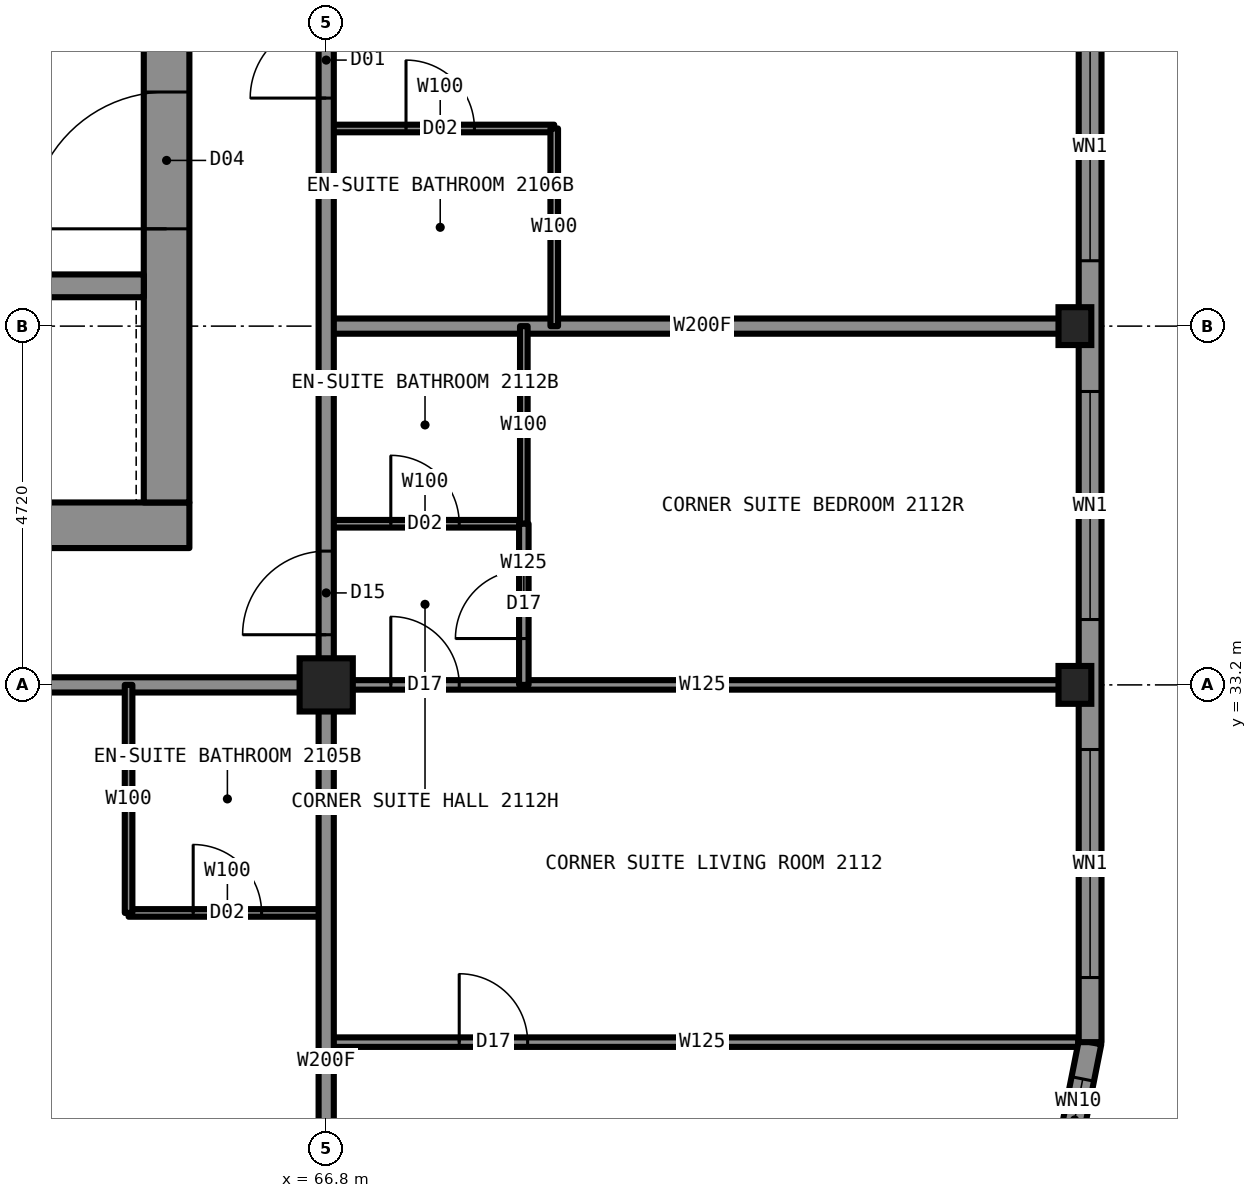
"""IFC4 building model, lengths in metres.
Left out: names, types, materials, properties, quantities, classifications, styles, units other than length and angle.
Written with IfcOpenShell. Run it as: python <this file> out.ifc"""

import sys

from ifc_helpers import new_model, si_unit, direction, frame, frame_2d, origin, origin_2d, place, context, subcontext, project, spatial, rectangle, hollow_rectangle, i_section, extrude, element, fill, save


model = new_model("IFC4")
c1 = context("Model", 3, precision=1e-05, world=origin(), true_north=direction((0.0, 1.0)))
c2 = subcontext(c1, "Body", "Model", "MODEL_VIEW")
j1 = project(units=[si_unit("LENGTHUNIT", "METRE"), si_unit("PLANEANGLEUNIT", "RADIAN")], contexts=[c1])
p1 = place(None, origin())
s1 = spatial("IfcSite", under=j1, at=p1, CompositionType="ELEMENT")
p2 = place(p1, origin())
s2 = spatial("IfcBuilding", under=s1, at=p2, CompositionType="ELEMENT")
p3 = place(p2, frame((0.0, 0.0, 81.0)))
s3 = spatial("IfcBuildingStorey", under=s2, at=p3, CompositionType="ELEMENT", Elevation=81.0)
for number, where, z_axis, x_axis in (
    (1, (76.65, 33.2, 0.0), (0.0, 0.0, 1.0), (1.0, 0.0, 0.0)),
    (2, (76.65, 37.92, 0.0), (0.0, 0.0, 1.0), (1.0, 0.0, 0.0)),
):
    element("IfcColumn", number, at=place(p3, frame(where, z_axis=z_axis, x_axis=x_axis)), inside=s3, PredefinedType="COLUMN", context=c2, shape_type="SweptSolid", body=[
        extrude(i_section(OverallWidth=0.432, OverallDepth=0.498, WebThickness=0.056, FlangeThickness=0.089, at=origin_2d()), origin(), (0.0, 0.0, 1.0), 3.5),
    ])
p4 = place(p3, frame((66.8, 33.2, 0.0), z_axis=(0.0, 0.0, 1.0), x_axis=(1.0, 0.0, 0.0)))
e3 = element("IfcColumn", 3, at=p4, inside=s3, PredefinedType="COLUMN", context=c2, shape_type="SweptSolid", body=[
    extrude(hollow_rectangle(XDim=0.7, YDim=0.7, WallThickness=0.06, at=origin_2d()), origin(), (0.0, 0.0, 1.0), 3.5),
])
p5 = place(p3, frame((45.0, 35.3, 0.0), z_axis=(0.0, 0.0, 1.0), x_axis=(1.0, 0.0, 0.0)))
e4 = element("IfcWall", 4, at=p5, inside=s3, PredefinedType="SHEAR", context=c2, shape_type="SweptSolid", body=[
    extrude(rectangle(XDim=20.0, YDim=0.6, at=frame_2d((10.0, 0.0))), origin(), (0.0, 0.0, 1.0), 3.5),
])
p6 = place(p3, frame((64.7, 35.6, 0.0), z_axis=(0.0, 0.0, 1.0), x_axis=(0.0, 1.0, 0.0)))
e5 = element("IfcWall", 5, at=p6, inside=s3, PredefinedType="SHEAR", context=c2, shape_type="SweptSolid", body=[
    extrude(rectangle(XDim=18.8, YDim=0.6, at=frame_2d((9.4, 0.0))), origin(), (0.0, 0.0, 1.0), 3.5),
])
p7 = place(p6, frame((13.4, 0.0, 0.0)))
e6 = element("IfcOpeningElement", 6, at=p7, cuts=e5, PredefinedType="OPENING", context=c2, shape_type="SweptSolid", body=[
    extrude(rectangle(XDim=1.8, YDim=2.2, at=frame_2d((0.9, 1.1))), frame((0.0, 0.31, 0.0), z_axis=(0.0, -1.0, 0.0), x_axis=(1.0, 0.0, 0.0)), (0.0, 0.0, 1.0), 0.62),
])
p8 = place(p6, frame((3.6, 0.0, 0.0)))
e7 = element("IfcOpeningElement", 7, at=p8, cuts=e5, PredefinedType="OPENING", context=c2, shape_type="SweptSolid", body=[
    extrude(rectangle(XDim=1.8, YDim=2.2, at=frame_2d((0.9, 1.1))), frame((0.0, 0.31, 0.0), z_axis=(0.0, -1.0, 0.0), x_axis=(1.0, 0.0, 0.0)), (0.0, 0.0, 1.0), 0.62),
])
p9 = place(p3, frame((45.6, 38.45, 0.0), z_axis=(0.0, 0.0, 1.0), x_axis=(1.0, 0.0, 0.0)))
e8 = element("IfcWall", 8, at=p9, inside=s3, PredefinedType="SHEAR", context=c2, shape_type="SweptSolid", body=[
    extrude(rectangle(XDim=18.8, YDim=0.3, at=frame_2d((9.4, 0.0))), origin(), (0.0, 0.0, 1.0), 3.5),
])
p10 = place(p3, frame((43.2, 33.2, 0.0), z_axis=(0.0, 0.0, 1.0), x_axis=(1.0, 0.0, 0.0)))
e9 = element("IfcWall", 9, at=p10, inside=s3, PredefinedType="PARTITIONING", context=c2, shape_type="SweptSolid", body=[
    extrude(rectangle(XDim=23.6, YDim=0.2, at=frame_2d((11.8, 0.0))), origin(), (0.0, 0.0, 1.0), 3.33),
])
p11 = place(p10, frame((3.0, 0.0, 0.0)))
e10 = element("IfcOpeningElement", 10, at=p11, cuts=e9, PredefinedType="OPENING", context=c2, shape_type="SweptSolid", body=[
    extrude(rectangle(XDim=1.0, YDim=2.2, at=frame_2d((0.5, 1.1))), frame((0.0, 0.11, 0.0), z_axis=(0.0, -1.0, 0.0), x_axis=(1.0, 0.0, 0.0)), (0.0, 0.0, 1.0), 0.22),
])
p12 = place(p10, frame((11.29, 0.0, 0.0)))
e11 = element("IfcOpeningElement", 11, at=p12, cuts=e9, PredefinedType="OPENING", context=c2, shape_type="SweptSolid", body=[
    extrude(rectangle(XDim=1.1, YDim=2.2, at=frame_2d((0.55, 1.1))), frame((0.0, 0.11, 0.0), z_axis=(0.0, -1.0, 0.0), x_axis=(1.0, 0.0, 0.0)), (0.0, 0.0, 1.0), 0.22),
])
p13 = place(p3, frame((66.8, 33.2, 0.0), z_axis=(0.0, 0.0, 1.0), x_axis=(1.0, 0.0, 0.0)))
e12 = element("IfcWall", 12, at=p13, inside=s3, PredefinedType="PARTITIONING", context=c2, shape_type="SweptSolid", body=[
    extrude(rectangle(XDim=9.9, YDim=0.125, at=frame_2d((4.95, 0.0))), origin(), (0.0, 0.0, 1.0), 2.573),
])
p14 = place(p13, frame((0.85, 0.0, 0.0)))
e13 = element("IfcOpeningElement", 13, at=p14, cuts=e12, PredefinedType="OPENING", context=c2, shape_type="SweptSolid", body=[
    extrude(rectangle(XDim=0.9, YDim=2.2, at=frame_2d((0.45, 1.1))), frame((0.0, 0.073, 0.0), z_axis=(0.0, -1.0, 0.0), x_axis=(1.0, 0.0, 0.0)), (0.0, 0.0, 1.0), 0.145),
])
p15 = place(p3, frame((64.2, 30.2, 0.0), z_axis=(0.0, 0.0, 1.0), x_axis=(1.0, 0.0, 0.0)))
e14 = element("IfcWall", 14, at=p15, inside=s3, PredefinedType="PARTITIONING", context=c2, shape_type="SweptSolid", body=[
    extrude(rectangle(XDim=2.6, YDim=0.1, at=frame_2d((1.3, 0.0))), origin(), (0.0, 0.0, 1.0), 3.33),
])
p16 = place(p15, frame((0.85, 0.0, 0.0)))
e15 = element("IfcOpeningElement", 15, at=p16, cuts=e14, PredefinedType="OPENING", context=c2, shape_type="SweptSolid", body=[
    extrude(rectangle(XDim=0.9, YDim=2.1, at=frame_2d((0.45, 1.05))), frame((0.0, 0.06, 0.0), z_axis=(0.0, -1.0, 0.0), x_axis=(1.0, 0.0, 0.0)), (0.0, 0.0, 1.0), 0.12),
])
p17 = place(p3, frame((66.8, 28.5, 0.0), z_axis=(0.0, 0.0, 1.0), x_axis=(1.0, 0.0, 0.0)))
e16 = element("IfcWall", 16, at=p17, inside=s3, PredefinedType="PARTITIONING", context=c2, shape_type="SweptSolid", body=[
    extrude(rectangle(XDim=9.894, YDim=0.125, at=frame_2d((4.947, 0.0))), origin(), (0.0, 0.0, 1.0), 3.33),
])
p18 = place(p17, frame((1.75, 0.0, 0.0)))
e17 = element("IfcOpeningElement", 17, at=p18, cuts=e16, PredefinedType="OPENING", context=c2, shape_type="SweptSolid", body=[
    extrude(rectangle(XDim=0.9, YDim=2.2, at=frame_2d((0.45, 1.1))), frame((0.0, 0.073, 0.0), z_axis=(0.0, -1.0, 0.0), x_axis=(1.0, 0.0, 0.0)), (0.0, 0.0, 1.0), 0.145),
])
p19 = place(p3, frame((66.8, 40.52, 0.0), z_axis=(0.0, 0.0, 1.0), x_axis=(1.0, 0.0, 0.0)))
e18 = element("IfcWall", 18, at=p19, inside=s3, PredefinedType="PARTITIONING", context=c2, shape_type="SweptSolid", body=[
    extrude(rectangle(XDim=3.0, YDim=0.1, at=frame_2d((1.5, 0.0))), origin(), (0.0, 0.0, 1.0), 3.33),
])
p20 = place(p19, frame((1.05, 0.0, 0.0)))
e19 = element("IfcOpeningElement", 19, at=p20, cuts=e18, PredefinedType="OPENING", context=c2, shape_type="SweptSolid", body=[
    extrude(rectangle(XDim=0.9, YDim=2.1, at=frame_2d((0.45, 1.05))), frame((0.0, 0.06, 0.0), z_axis=(0.0, -1.0, 0.0), x_axis=(1.0, 0.0, 0.0)), (0.0, 0.0, 1.0), 0.12),
])
p21 = place(p3, frame((66.8, 37.92, 0.0), z_axis=(0.0, 0.0, 1.0), x_axis=(1.0, 0.0, 0.0)))
e20 = element("IfcWall", 20, at=p21, inside=s3, PredefinedType="PARTITIONING", context=c2, shape_type="SweptSolid", body=[
    extrude(rectangle(XDim=9.9, YDim=0.2, at=frame_2d((4.95, 0.0))), origin(), (0.0, 0.0, 1.0), 2.573),
])
p22 = place(p3, frame((66.8, 35.32, 0.0), z_axis=(0.0, 0.0, 1.0), x_axis=(1.0, 0.0, 0.0)))
e21 = element("IfcWall", 21, at=p22, inside=s3, PredefinedType="PARTITIONING", context=c2, shape_type="SweptSolid", body=[
    extrude(rectangle(XDim=2.6, YDim=0.1, at=frame_2d((1.3, 0.0))), origin(), (0.0, 0.0, 1.0), 3.33),
])
p23 = place(p22, frame((0.85, 0.0, 0.0)))
e22 = element("IfcOpeningElement", 22, at=p23, cuts=e21, PredefinedType="OPENING", context=c2, shape_type="SweptSolid", body=[
    extrude(rectangle(XDim=0.9, YDim=2.1, at=frame_2d((0.45, 1.05))), frame((0.0, 0.06, 0.0), z_axis=(0.0, -1.0, 0.0), x_axis=(1.0, 0.0, 0.0)), (0.0, 0.0, 1.0), 0.12),
])
p24 = place(p3, frame((66.8, 33.2, 0.0), z_axis=(0.0, 0.0, 1.0), x_axis=(0.0, 1.0, 0.0)))
e23 = element("IfcWall", 23, at=p24, inside=s3, PredefinedType="PARTITIONING", context=c2, shape_type="SweptSolid", body=[
    extrude(rectangle(XDim=23.6, YDim=0.2, at=frame_2d((11.8, 0.0))), origin(), (0.0, 0.0, 1.0), 3.33),
])
p25 = place(p24, frame((7.72, 0.0, 0.0)))
e24 = element("IfcOpeningElement", 24, at=p25, cuts=e23, PredefinedType="OPENING", context=c2, shape_type="SweptSolid", body=[
    extrude(rectangle(XDim=1.0, YDim=2.2, at=frame_2d((0.5, 1.1))), frame((0.0, 0.11, 0.0), z_axis=(0.0, -1.0, 0.0), x_axis=(1.0, 0.0, 0.0)), (0.0, 0.0, 1.0), 0.22),
])
p26 = place(p24, frame((16.42, 0.0, 0.0)))
e25 = element("IfcOpeningElement", 25, at=p26, cuts=e23, PredefinedType="OPENING", context=c2, shape_type="SweptSolid", body=[
    extrude(rectangle(XDim=1.0, YDim=2.2, at=frame_2d((0.5, 1.1))), frame((0.0, 0.11, 0.0), z_axis=(0.0, -1.0, 0.0), x_axis=(1.0, 0.0, 0.0)), (0.0, 0.0, 1.0), 0.22),
])
p27 = place(p24, frame((21.85, 0.0, 0.0)))
e26 = element("IfcOpeningElement", 26, at=p27, cuts=e23, PredefinedType="OPENING", context=c2, shape_type="SweptSolid", body=[
    extrude(rectangle(XDim=1.1, YDim=2.2, at=frame_2d((0.55, 1.1))), frame((0.0, 0.11, 0.0), z_axis=(0.0, -1.0, 0.0), x_axis=(1.0, 0.0, 0.0)), (0.0, 0.0, 1.0), 0.22),
])
p28 = place(p24, frame((0.66, 0.0, 0.0)))
e27 = element("IfcOpeningElement", 27, at=p28, cuts=e23, PredefinedType="OPENING", context=c2, shape_type="SweptSolid", body=[
    extrude(rectangle(XDim=1.1, YDim=2.2, at=frame_2d((0.55, 1.1))), frame((0.0, 0.11, 0.0), z_axis=(0.0, -1.0, 0.0), x_axis=(1.0, 0.0, 0.0)), (0.0, 0.0, 1.0), 0.22),
])
p29 = place(p3, frame((66.8, 23.3, 0.0), z_axis=(0.0, 0.0, 1.0), x_axis=(0.0, 1.0, 0.0)))
e28 = element("IfcWall", 28, at=p29, inside=s3, PredefinedType="PARTITIONING", context=c2, shape_type="SweptSolid", body=[
    extrude(rectangle(XDim=9.9, YDim=0.2, at=frame_2d((4.95, 0.0))), origin(), (0.0, 0.0, 1.0), 2.573),
])
p30 = place(p3, frame((69.4, 35.32, 0.0), z_axis=(0.0, 0.0, 1.0), x_axis=(0.0, 1.0, 0.0)))
e29 = element("IfcWall", 29, at=p30, inside=s3, PredefinedType="PARTITIONING", context=c2, shape_type="SweptSolid", body=[
    extrude(rectangle(XDim=2.6, YDim=0.1, at=frame_2d((1.3, 0.0))), origin(), (0.0, 0.0, 1.0), 3.33),
])
p31 = place(p3, frame((69.4, 33.2, 0.0), z_axis=(0.0, 0.0, 1.0), x_axis=(0.0, 1.0, 0.0)))
e30 = element("IfcWall", 30, at=p31, inside=s3, PredefinedType="PARTITIONING", context=c2, shape_type="SweptSolid", body=[
    extrude(rectangle(XDim=2.12, YDim=0.125, at=frame_2d((1.06, 0.0))), origin(), (0.0, 0.0, 1.0), 3.33),
])
p32 = place(p31, frame((0.61, 0.0, 0.0)))
e31 = element("IfcOpeningElement", 31, at=p32, cuts=e30, PredefinedType="OPENING", context=c2, shape_type="SweptSolid", body=[
    extrude(rectangle(XDim=0.9, YDim=2.2, at=frame_2d((0.45, 1.1))), frame((0.0, 0.073, 0.0), z_axis=(0.0, -1.0, 0.0), x_axis=(1.0, 0.0, 0.0)), (0.0, 0.0, 1.0), 0.145),
])
p33 = place(p3, frame((69.8, 37.92, 0.0), z_axis=(0.0, 0.0, 1.0), x_axis=(0.0, 1.0, 0.0)))
e32 = element("IfcWall", 32, at=p33, inside=s3, PredefinedType="PARTITIONING", context=c2, shape_type="SweptSolid", body=[
    extrude(rectangle(XDim=2.6, YDim=0.1, at=frame_2d((1.3, 0.0))), origin(), (0.0, 0.0, 1.0), 3.33),
])
p34 = place(p3, frame((64.2, 30.2, 0.0), z_axis=(0.0, 0.0, 1.0), x_axis=(0.0, 1.0, 0.0)))
e33 = element("IfcWall", 33, at=p34, inside=s3, PredefinedType="PARTITIONING", context=c2, shape_type="SweptSolid", body=[
    extrude(rectangle(XDim=3.0, YDim=0.1, at=frame_2d((1.5, 0.0))), origin(), (0.0, 0.0, 1.0), 3.33),
])
p35 = place(p3, frame((76.443, 26.453, 0.0), z_axis=(0.0, 0.0, 1.0), x_axis=(0.195081421501, 0.980787050784, 0.0)))
e34 = element("IfcWall", 34, at=p35, inside=s3, PredefinedType="SOLIDWALL", context=c2, shape_type="SweptSolid", body=[
    extrude(rectangle(XDim=2.087, YDim=0.3, at=frame_2d((1.044, 0.0))), origin(), (0.0, 0.0, 1.0), 3.33),
])
p36 = place(p35, frame((0.994, 0.0, 1.65)))
e35 = element("IfcOpeningElement", 35, at=p36, cuts=e34, PredefinedType="OPENING", context=c2, shape_type="SweptSolid", body=[
    extrude(rectangle(XDim=0.6, YDim=0.8, at=frame_2d((0.3, 0.4))), frame((0.0, 0.16, 0.0), z_axis=(0.0, -1.0, 0.0), x_axis=(1.0, 0.0, 0.0)), (0.0, 0.0, 1.0), 0.32),
])
p37 = place(p3, frame((76.85, 28.5, 0.0), z_axis=(0.0, 0.0, 1.0), x_axis=(0.0, 1.0, 0.0)))
e36 = element("IfcWall", 36, at=p37, inside=s3, PredefinedType="SOLIDWALL", context=c2, shape_type="SweptSolid", body=[
    extrude(rectangle(XDim=33.0, YDim=0.3, at=frame_2d((16.5, 0.0))), origin(), (0.0, 0.0, 1.0), 2.63),
])
p38 = place(p37, frame((0.85, 0.0, 0.5)))
e37 = element("IfcOpeningElement", 37, at=p38, cuts=e36, PredefinedType="OPENING", context=c2, shape_type="SweptSolid", body=[
    extrude(rectangle(XDim=3.0, YDim=2.0, at=frame_2d((1.5, 1.0))), frame((0.0, 0.16, 0.0), z_axis=(0.0, -1.0, 0.0), x_axis=(1.0, 0.0, 0.0)), (0.0, 0.0, 1.0), 0.32),
])
p39 = place(p37, frame((5.56, 0.0, 0.5)))
e38 = element("IfcOpeningElement", 38, at=p39, cuts=e36, PredefinedType="OPENING", context=c2, shape_type="SweptSolid", body=[
    extrude(rectangle(XDim=3.0, YDim=2.0, at=frame_2d((1.5, 1.0))), frame((0.0, 0.16, 0.0), z_axis=(0.0, -1.0, 0.0), x_axis=(1.0, 0.0, 0.0)), (0.0, 0.0, 1.0), 0.32),
])
p40 = place(p37, frame((10.28, 0.0, 0.5)))
e39 = element("IfcOpeningElement", 39, at=p40, cuts=e36, PredefinedType="OPENING", context=c2, shape_type="SweptSolid", body=[
    extrude(rectangle(XDim=3.0, YDim=2.0, at=frame_2d((1.5, 1.0))), frame((0.0, 0.16, 0.0), z_axis=(0.0, -1.0, 0.0), x_axis=(1.0, 0.0, 0.0)), (0.0, 0.0, 1.0), 0.32),
])
p41 = place(p37, frame((15.0, 0.0, 0.5)))
e40 = element("IfcOpeningElement", 40, at=p41, cuts=e36, PredefinedType="OPENING", context=c2, shape_type="SweptSolid", body=[
    extrude(rectangle(XDim=3.0, YDim=2.0, at=frame_2d((1.5, 1.0))), frame((0.0, 0.16, 0.0), z_axis=(0.0, -1.0, 0.0), x_axis=(1.0, 0.0, 0.0)), (0.0, 0.0, 1.0), 0.32),
])
p42 = place(p37, frame((19.72, 0.0, 0.5)))
e41 = element("IfcOpeningElement", 41, at=p42, cuts=e36, PredefinedType="OPENING", context=c2, shape_type="SweptSolid", body=[
    extrude(rectangle(XDim=3.0, YDim=2.0, at=frame_2d((1.5, 1.0))), frame((0.0, 0.16, 0.0), z_axis=(0.0, -1.0, 0.0), x_axis=(1.0, 0.0, 0.0)), (0.0, 0.0, 1.0), 0.32),
])
p43 = place(p37, frame((24.44, 0.0, 0.5)))
e42 = element("IfcOpeningElement", 42, at=p43, cuts=e36, PredefinedType="OPENING", context=c2, shape_type="SweptSolid", body=[
    extrude(rectangle(XDim=3.0, YDim=2.0, at=frame_2d((1.5, 1.0))), frame((0.0, 0.16, 0.0), z_axis=(0.0, -1.0, 0.0), x_axis=(1.0, 0.0, 0.0)), (0.0, 0.0, 1.0), 0.32),
])
p44 = place(p37, frame((29.15, 0.0, 0.5)))
e43 = element("IfcOpeningElement", 43, at=p44, cuts=e36, PredefinedType="OPENING", context=c2, shape_type="SweptSolid", body=[
    extrude(rectangle(XDim=3.0, YDim=2.0, at=frame_2d((1.5, 1.0))), frame((0.0, 0.16, 0.0), z_axis=(0.0, -1.0, 0.0), x_axis=(1.0, 0.0, 0.0)), (0.0, 0.0, 1.0), 0.32),
])
p45 = place(p16, origin())
e44 = element("IfcDoor", 44, at=p45, inside=s3, OperationType="SINGLE_SWING_RIGHT", PredefinedType="DOOR", context=c2, shape_type="SweptSolid", body=[
    extrude(rectangle(XDim=0.9, YDim=2.1, at=frame_2d((0.45, 1.05))), frame((0.0, 0.025, 0.0), z_axis=(0.0, -1.0, 0.0), x_axis=(1.0, 0.0, 0.0)), (0.0, 0.0, 1.0), 0.05),
])
fill(e15, e44)
p46 = place(p25, origin())
e45 = element("IfcDoor", 45, at=p46, inside=s3, OperationType="SINGLE_SWING_LEFT", PredefinedType="DOOR", context=c2, shape_type="SweptSolid", body=[
    extrude(rectangle(XDim=1.0, YDim=2.2, at=frame_2d((0.5, 1.1))), frame((0.0, 0.025, 0.0), z_axis=(0.0, -1.0, 0.0), x_axis=(1.0, 0.0, 0.0)), (0.0, 0.0, 1.0), 0.05),
])
fill(e24, e45)
p47 = place(p20, origin())
e46 = element("IfcDoor", 46, at=p47, inside=s3, OperationType="SINGLE_SWING_RIGHT", PredefinedType="DOOR", context=c2, shape_type="SweptSolid", body=[
    extrude(rectangle(XDim=0.9, YDim=2.1, at=frame_2d((0.45, 1.05))), frame((0.0, 0.025, 0.0), z_axis=(0.0, -1.0, 0.0), x_axis=(1.0, 0.0, 0.0)), (0.0, 0.0, 1.0), 0.05),
])
fill(e19, e46)
p48 = place(p14, origin())
e47 = element("IfcDoor", 47, at=p48, inside=s3, OperationType="SINGLE_SWING_LEFT", PredefinedType="DOOR", context=c2, shape_type="SweptSolid", body=[
    extrude(rectangle(XDim=0.9, YDim=2.2, at=frame_2d((0.45, 1.1))), frame((0.0, 0.025, 0.0), z_axis=(0.0, -1.0, 0.0), x_axis=(1.0, 0.0, 0.0)), (0.0, 0.0, 1.0), 0.05),
])
fill(e13, e47)
p49 = place(p23, origin())
e48 = element("IfcDoor", 48, at=p49, inside=s3, OperationType="SINGLE_SWING_RIGHT", PredefinedType="DOOR", context=c2, shape_type="SweptSolid", body=[
    extrude(rectangle(XDim=0.9, YDim=2.1, at=frame_2d((0.45, 1.05))), frame((0.0, 0.025, 0.0), z_axis=(0.0, -1.0, 0.0), x_axis=(1.0, 0.0, 0.0)), (0.0, 0.0, 1.0), 0.05),
])
fill(e22, e48)
p50 = place(p28, origin())
e49 = element("IfcDoor", 49, at=p50, inside=s3, OperationType="SINGLE_SWING_LEFT", PredefinedType="DOOR", context=c2, shape_type="SweptSolid", body=[
    extrude(rectangle(XDim=1.1, YDim=2.2, at=frame_2d((0.55, 1.1))), frame((0.0, 0.025, 0.0), z_axis=(0.0, -1.0, 0.0), x_axis=(1.0, 0.0, 0.0)), (0.0, 0.0, 1.0), 0.05),
])
fill(e27, e49)
p51 = place(p18, origin())
e50 = element("IfcDoor", 50, at=p51, inside=s3, OperationType="SINGLE_SWING_LEFT", PredefinedType="DOOR", context=c2, shape_type="SweptSolid", body=[
    extrude(rectangle(XDim=0.9, YDim=2.2, at=frame_2d((0.45, 1.1))), frame((0.0, 0.025, 0.0), z_axis=(0.0, -1.0, 0.0), x_axis=(1.0, 0.0, 0.0)), (0.0, 0.0, 1.0), 0.05),
])
fill(e17, e50)
p52 = place(p32, origin())
e51 = element("IfcDoor", 51, at=p52, inside=s3, OperationType="SINGLE_SWING_LEFT", PredefinedType="DOOR", context=c2, shape_type="SweptSolid", body=[
    extrude(rectangle(XDim=0.9, YDim=2.2, at=frame_2d((0.45, 1.1))), frame((0.0, 0.025, 0.0), z_axis=(0.0, -1.0, 0.0), x_axis=(1.0, 0.0, 0.0)), (0.0, 0.0, 1.0), 0.05),
])
fill(e31, e51)
p53 = place(p36, origin())
e52 = element("IfcWindow", 52, at=p53, inside=s3, PartitioningType="SINGLE_PANEL", PredefinedType="WINDOW", context=c2, shape_type="SweptSolid", body=[
    extrude(rectangle(XDim=0.6, YDim=0.8, at=frame_2d((0.3, 0.4))), frame((0.0, 0.03, 0.0), z_axis=(0.0, -1.0, 0.0), x_axis=(1.0, 0.0, 0.0)), (0.0, 0.0, 1.0), 0.06),
])
fill(e35, e52)
p54 = place(p38, origin())
e53 = element("IfcWindow", 53, at=p54, inside=s3, PartitioningType="SINGLE_PANEL", PredefinedType="WINDOW", context=c2, shape_type="SweptSolid", body=[
    extrude(rectangle(XDim=3.0, YDim=2.0, at=frame_2d((1.5, 1.0))), frame((0.0, 0.03, 0.0), z_axis=(0.0, -1.0, 0.0), x_axis=(1.0, 0.0, 0.0)), (0.0, 0.0, 1.0), 0.06),
])
fill(e37, e53)
p55 = place(p39, origin())
e54 = element("IfcWindow", 54, at=p55, inside=s3, PartitioningType="SINGLE_PANEL", PredefinedType="WINDOW", context=c2, shape_type="SweptSolid", body=[
    extrude(rectangle(XDim=3.0, YDim=2.0, at=frame_2d((1.5, 1.0))), frame((0.0, 0.03, 0.0), z_axis=(0.0, -1.0, 0.0), x_axis=(1.0, 0.0, 0.0)), (0.0, 0.0, 1.0), 0.06),
])
fill(e38, e54)
p56 = place(p40, origin())
e55 = element("IfcWindow", 55, at=p56, inside=s3, PartitioningType="SINGLE_PANEL", PredefinedType="WINDOW", context=c2, shape_type="SweptSolid", body=[
    extrude(rectangle(XDim=3.0, YDim=2.0, at=frame_2d((1.5, 1.0))), frame((0.0, 0.03, 0.0), z_axis=(0.0, -1.0, 0.0), x_axis=(1.0, 0.0, 0.0)), (0.0, 0.0, 1.0), 0.06),
])
fill(e39, e55)
p57 = place(p8, origin())
e56 = element("IfcDoor", 56, at=p57, inside=s3, OperationType="DOUBLE_DOOR_SINGLE_SWING", PredefinedType="DOOR", context=c2, shape_type="SweptSolid", body=[
    extrude(rectangle(XDim=1.8, YDim=2.2, at=frame_2d((0.9, 1.1))), frame((0.0, 0.025, 0.0), z_axis=(0.0, -1.0, 0.0), x_axis=(1.0, 0.0, 0.0)), (0.0, 0.0, 1.0), 0.05),
])
fill(e7, e56)
save(model, sys.argv[1])
